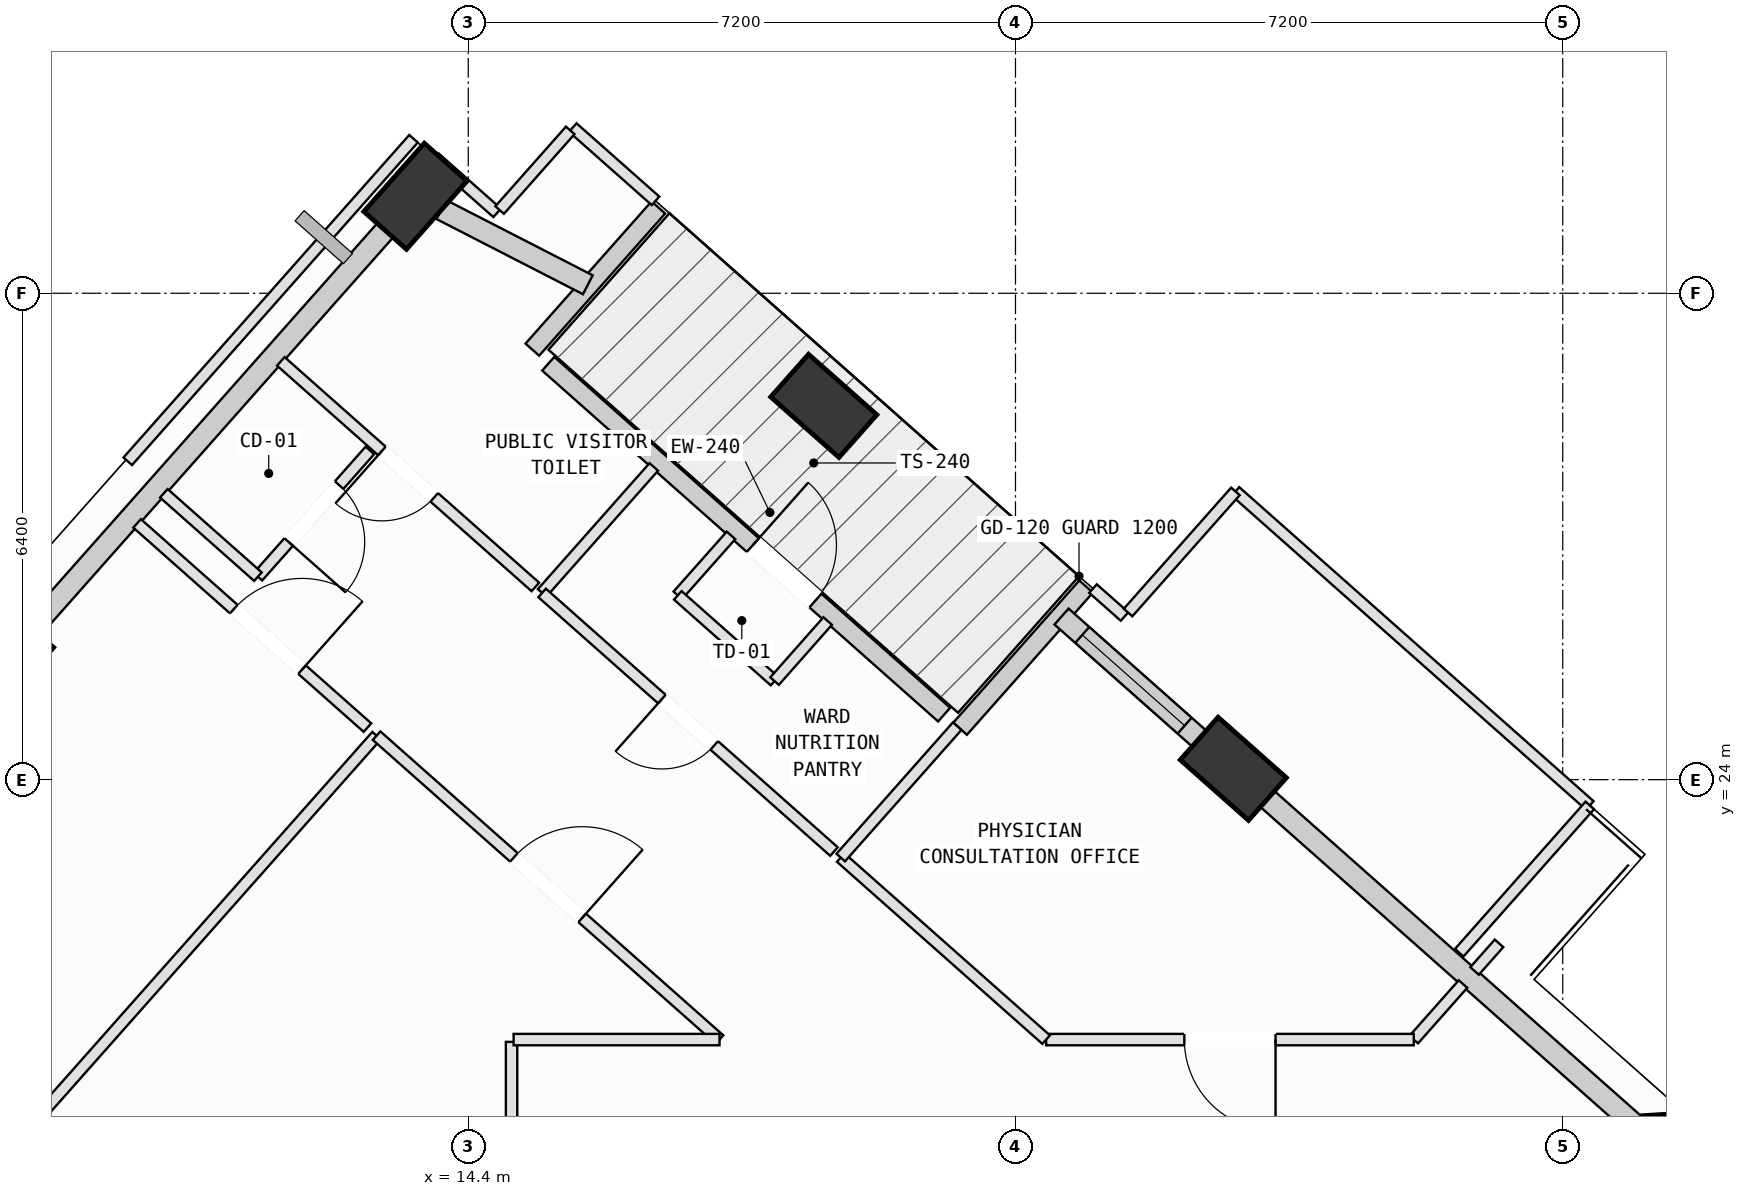
"""IFC4 building model, lengths in metres.
Left out: names, types, materials, properties, quantities, classifications, styles, units other than length and angle.
Written with IfcOpenShell. Run it as: python <this file> out.ifc"""

import sys

from ifc_helpers import new_model, si_unit, direction, frame, frame_2d, origin, origin_2d, place, context, subcontext, project, spatial, rectangle, extrude, element, fill, save


model = new_model("IFC4")
c1 = context("Model", 3, precision=1e-05, world=origin(), true_north=direction((0.0, 1.0)))
c2 = subcontext(c1, "Body", "Model", "MODEL_VIEW")
j1 = project(units=[si_unit("LENGTHUNIT", "METRE"), si_unit("PLANEANGLEUNIT", "RADIAN")], contexts=[c1])
p1 = place(None, origin())
s1 = spatial("IfcSite", under=j1, at=p1, CompositionType="ELEMENT")
p2 = place(p1, origin())
s2 = spatial("IfcBuilding", under=s1, at=p2, CompositionType="ELEMENT")
p3 = place(p2, frame((0.0, 0.0, 231.2)))
s3 = spatial("IfcBuildingStorey", under=s2, at=p3, CompositionType="ELEMENT", Elevation=231.2)
p4 = place(p3, frame((30.266, 19.003, 0.002), z_axis=(0.024121719548, -0.013618084707, 0.999616271584), x_axis=(-0.898481897541, 0.438138960704, 0.02765015198)))
e1 = element("IfcColumn", 1, at=p4, inside=s3, PredefinedType="COLUMN", context=c2, shape_type="SweptSolid", body=[
    extrude(rectangle(XDim=1.2, YDim=0.75, at=origin_2d()), origin(), (0.0, 0.0, 1.0), 3.998),
])
p5 = place(p3, frame((24.466, 24.143, 0.002), z_axis=(0.002991304926, -0.037849164373, 0.999278986495), x_axis=(-0.798270232105, 0.601772774406, 0.025182623343)))
e2 = element("IfcColumn", 2, at=p5, inside=s3, PredefinedType="COLUMN", context=c2, shape_type="SweptSolid", body=[
    extrude(rectangle(XDim=1.2, YDim=0.75, at=origin_2d()), origin(), (0.0, 0.0, 1.0), 3.999),
])
p6 = place(p3, frame((19.078, 28.918, 0.002), z_axis=(-0.016523414355, -0.060179372579, 0.998050810277), x_axis=(-0.54639584445, 0.836503575836, 0.041392617478)))
e3 = element("IfcColumn", 3, at=p6, inside=s3, PredefinedType="COLUMN", context=c2, shape_type="SweptSolid", body=[
    extrude(rectangle(XDim=1.2, YDim=0.75, at=origin_2d()), origin(), (0.0, 0.0, 1.0), 4.004),
])
p7 = place(p3, frame((13.705, 31.676, 0.002), z_axis=(-0.027691212934, -0.082404180907, 0.996214207736), x_axis=(0.866207153249, 0.495431720125, 0.065058268909)))
e4 = element("IfcColumn", 4, at=p7, inside=s3, PredefinedType="COLUMN", context=c2, shape_type="SweptSolid", body=[
    extrude(rectangle(XDim=1.2, YDim=0.75, at=origin_2d()), origin(), (0.0, 0.0, 1.0), 4.011),
])
p8 = place(p3, frame((8.266, 25.539, 0.002), z_axis=(-0.002187246162, -0.104441004248, 0.994528678614), x_axis=(0.678711632821, 0.73023191979, 0.078178403623)))
e5 = element("IfcColumn", 5, at=p8, inside=s3, PredefinedType="COLUMN", context=c2, shape_type="SweptSolid", body=[
    extrude(rectangle(XDim=1.2, YDim=0.75, at=origin_2d()), origin(), (0.0, 0.0, 1.0), 4.018),
])
p9 = place(p3, frame((15.453, 29.472, 0.0), z_axis=(0.0, 0.0, 1.0), x_axis=(0.748374243489, -0.663276708232, 0.0)))
e6 = element("IfcWall", 6, at=p9, inside=s3, PredefinedType="SOLIDWALL", context=c2, shape_type="SweptSolid", body=[
    extrude(rectangle(XDim=6.96, YDim=0.24, at=frame_2d((3.48, 0.0))), origin(), (0.0, 0.0, 1.0), 3.265),
])
p10 = place(p9, frame((3.597, 0.0, 0.0)))
e7 = element("IfcOpeningElement", 7, at=p10, cuts=e6, PredefinedType="OPENING", context=c2, shape_type="SweptSolid", body=[
    extrude(rectangle(XDim=1.1, YDim=2.15, at=frame_2d((0.55, 1.075))), frame((0.0, 0.13, 0.0), z_axis=(0.0, -1.0, 0.0), x_axis=(1.0, 0.0, 0.0)), (0.0, 0.0, 1.0), 0.26),
])
p11 = place(p3, frame((20.871, 24.67, 0.0), z_axis=(0.0, 0.0, 1.0), x_axis=(0.663241629679, 0.748405331796, 0.0)))
e8 = element("IfcWall", 8, at=p11, inside=s3, PredefinedType="SOLIDWALL", context=c2, shape_type="SweptSolid", body=[
    extrude(rectangle(XDim=2.5, YDim=0.24, at=frame_2d((1.25, 0.0))), origin(), (0.0, 0.0, 1.0), 3.265),
])
p12 = place(p3, frame((16.901, 31.529, 0.0), z_axis=(0.0, 0.0, 1.0), x_axis=(-0.663296327446, -0.748356854714, 0.0)))
e9 = element("IfcWall", 9, at=p12, inside=s3, PredefinedType="SOLIDWALL", context=c2, shape_type="SweptSolid", body=[
    extrude(rectangle(XDim=2.5, YDim=0.24, at=frame_2d((1.25, 0.0))), origin(), (0.0, 0.0, 1.0), 3.265),
])
p13 = place(p3, frame((24.802, 23.845, 0.0), z_axis=(0.0, 0.0, 1.0), x_axis=(0.748368709558, -0.663282952106, 0.0)))
e10 = element("IfcWall", 10, at=p13, inside=s3, PredefinedType="SOLIDWALL", context=c2, shape_type="SweptSolid", body=[
    extrude(rectangle(XDim=6.958, YDim=0.28, at=frame_2d((3.479, 0.0))), origin(), (0.0, 0.0, 1.0), 3.165),
])
p14 = place(p3, frame((22.206, 26.146, 0.0), z_axis=(0.0, 0.0, 1.0), x_axis=(0.74835824109, -0.663294763278, 0.0)))
e11 = element("IfcWall", 11, at=p14, inside=s3, PredefinedType="SOLIDWALL", context=c2, shape_type="SweptSolid", body=[
    extrude(rectangle(XDim=2.681, YDim=0.28, at=frame_2d((1.34, 0.0))), origin(), (0.0, 0.0, 1.0), 3.245),
])
p15 = place(p14, frame((0.365, 0.0, 0.75)))
e12 = element("IfcOpeningElement", 12, at=p15, cuts=e11, PredefinedType="OPENING", context=c2, shape_type="SweptSolid", body=[
    extrude(rectangle(XDim=1.8, YDim=2.05, at=frame_2d((0.9, 1.025))), frame((0.0, 0.15, 0.0), z_axis=(0.0, -1.0, 0.0), x_axis=(1.0, 0.0, 0.0)), (0.0, 0.0, 1.0), 0.3),
])
p16 = place(p3, frame((14.046, 31.501, 0.0), z_axis=(0.0, 0.0, 1.0), x_axis=(0.88971181746, -0.456522597329, 0.0)))
e13 = element("IfcWall", 13, at=p16, inside=s3, PredefinedType="SOLIDWALL", context=c2, shape_type="SweptSolid", body=[
    extrude(rectangle(XDim=2.166, YDim=0.28, at=frame_2d((1.083, 0.0))), origin(), (0.0, 0.0, 1.0), 3.265),
])
p17 = place(p3, frame((8.407, 25.699, 0.0), z_axis=(0.0, 0.0, 1.0), x_axis=(0.66326446151, 0.748385097458, 0.0)))
e14 = element("IfcWall", 14, at=p17, inside=s3, PredefinedType="SOLIDWALL", context=c2, shape_type="SweptSolid", body=[
    extrude(rectangle(XDim=7.434, YDim=0.28, at=frame_2d((3.717, 0.0))), origin(), (0.0, 0.0, 1.0), 3.265),
])
p18 = place(p3, frame((14.97, 20.55, 0.0), z_axis=(0.0, 0.0, 1.0), x_axis=(0.0, -1.0, 0.0)))
e15 = element("IfcWall", 15, at=p18, inside=s3, PredefinedType="PARTITIONING", context=c2, shape_type="SweptSolid", body=[
    extrude(rectangle(XDim=2.32, YDim=0.15, at=frame_2d((1.16, 0.0))), origin(), (0.0, 0.0, 1.0), 3.78),
])
p19 = place(p3, frame((3.921, 14.117, 0.0), z_axis=(0.0, 0.0, 1.0), x_axis=(0.663304180291, 0.748349894374, 0.0)))
e16 = element("IfcWall", 16, at=p19, inside=s3, PredefinedType="PARTITIONING", context=c2, shape_type="SweptSolid", body=[
    extrude(rectangle(XDim=13.98, YDim=0.15, at=frame_2d((6.99, 0.0))), origin(), (0.0, 0.0, 1.0), 3.78),
])
p20 = place(p3, frame((13.194, 24.579, 0.0), z_axis=(0.0, 0.0, 1.0), x_axis=(0.748364755265, -0.663287413627, 0.0)))
e17 = element("IfcWall", 17, at=p20, inside=s3, PredefinedType="PARTITIONING", context=c2, shape_type="SweptSolid", body=[
    extrude(rectangle(XDim=6.029, YDim=0.15, at=frame_2d((3.015, 0.0))), origin(), (0.0, 0.0, 1.0), 3.78),
])
p21 = place(p20, frame((2.415, 0.0, 0.0)))
e18 = element("IfcOpeningElement", 18, at=p21, cuts=e17, PredefinedType="OPENING", context=c2, shape_type="SweptSolid", body=[
    extrude(rectangle(XDim=1.2, YDim=2.15, at=frame_2d((0.6, 1.075))), frame((0.0, 0.085, 0.0), z_axis=(0.0, -1.0, 0.0), x_axis=(1.0, 0.0, 0.0)), (0.0, 0.0, 1.0), 0.17),
])
p22 = place(p3, frame((17.706, 20.58, 0.0), z_axis=(0.0, 0.0, 1.0), x_axis=(-1.0, 0.0, 0.0)))
e19 = element("IfcWall", 19, at=p22, inside=s3, PredefinedType="PARTITIONING", context=c2, shape_type="SweptSolid", body=[
    extrude(rectangle(XDim=2.709, YDim=0.15, at=frame_2d((1.354, 0.0))), origin(), (0.0, 0.0, 1.0), 3.78),
])
p23 = place(p3, frame((10.043, 27.372, 0.0), z_axis=(0.0, 0.0, 1.0), x_axis=(0.748293219075, -0.663368116725, 0.0)))
e20 = element("IfcWall", 20, at=p23, inside=s3, PredefinedType="PARTITIONING", context=c2, shape_type="SweptSolid", body=[
    extrude(rectangle(XDim=4.051, YDim=0.15, at=frame_2d((2.025, 0.0))), origin(), (0.0, 0.0, 1.0), 3.78),
])
p24 = place(p23, frame((1.7, 0.0, 0.0)))
e21 = element("IfcOpeningElement", 21, at=p24, cuts=e20, PredefinedType="OPENING", context=c2, shape_type="SweptSolid", body=[
    extrude(rectangle(XDim=1.2, YDim=2.15, at=frame_2d((0.6, 1.075))), frame((0.0, 0.085, 0.0), z_axis=(0.0, -1.0, 0.0), x_axis=(1.0, 0.0, 0.0)), (0.0, 0.0, 1.0), 0.17),
])
p25 = place(p3, frame((27.962, 21.846, 0.0), z_axis=(0.0, 0.0, 1.0), x_axis=(-0.663582811179, -0.74810283565, 0.0)))
e22 = element("IfcWall", 22, at=p25, inside=s3, PredefinedType="PARTITIONING", context=c2, shape_type="SweptSolid", body=[
    extrude(rectangle(XDim=0.485, YDim=0.15, at=frame_2d((0.243, 0.0))), origin(), (0.0, 0.0, 1.0), 3.78),
])
p26 = place(p3, frame((27.488, 21.311, 0.0), z_axis=(0.0, 0.0, 1.0), x_axis=(-0.663339325508, -0.748318741737, 0.0)))
e23 = element("IfcWall", 23, at=p26, inside=s3, PredefinedType="PARTITIONING", context=c2, shape_type="SweptSolid", body=[
    extrude(rectangle(XDim=0.977, YDim=0.15, at=frame_2d((0.488, 0.0))), origin(), (0.0, 0.0, 1.0), 3.78),
])
p27 = place(p3, frame((26.84, 20.58, 0.0), z_axis=(0.0, 0.0, 1.0), x_axis=(-1.0, 0.0, 0.0)))
e24 = element("IfcWall", 24, at=p27, inside=s3, PredefinedType="PARTITIONING", context=c2, shape_type="SweptSolid", body=[
    extrude(rectangle(XDim=4.837, YDim=0.15, at=frame_2d((2.418, 0.0))), origin(), (0.0, 0.0, 1.0), 3.415),
])
p28 = place(p27, frame((1.819, 0.0, 0.0)))
e25 = element("IfcOpeningElement", 25, at=p28, cuts=e24, PredefinedType="OPENING", context=c2, shape_type="SweptSolid", body=[
    extrude(rectangle(XDim=1.2, YDim=2.15, at=frame_2d((0.6, 1.075))), frame((0.0, 0.085, 0.0), z_axis=(0.0, -1.0, 0.0), x_axis=(1.0, 0.0, 0.0)), (0.0, 0.0, 1.0), 0.17),
])
p29 = place(p3, frame((22.003, 20.58, 0.0), z_axis=(0.0, 0.0, 1.0), x_axis=(-0.748326342524, 0.663330750896, 0.0)))
e26 = element("IfcWall", 26, at=p29, inside=s3, PredefinedType="PARTITIONING", context=c2, shape_type="SweptSolid", body=[
    extrude(rectangle(XDim=3.611, YDim=0.15, at=frame_2d((1.805, 0.0))), origin(), (0.0, 0.0, 1.0), 3.78),
])
p30 = place(p3, frame((19.301, 22.975, 0.0), z_axis=(0.0, 0.0, 1.0), x_axis=(0.663175680101, 0.74846377155, 0.0)))
e27 = element("IfcWall", 27, at=p30, inside=s3, PredefinedType="PARTITIONING", context=c2, shape_type="SweptSolid", body=[
    extrude(rectangle(XDim=2.31, YDim=0.15, at=frame_2d((1.155, 0.0))), origin(), (0.0, 0.0, 1.0), 3.78),
])
p31 = place(p3, frame((22.62, 26.514, 0.0), z_axis=(0.0, 0.0, 1.0), x_axis=(0.748988148045, -0.662583394063, 0.0)))
e28 = element("IfcWall", 28, at=p31, inside=s3, PredefinedType="PARTITIONING", context=c2, shape_type="SweptSolid", body=[
    extrude(rectangle(XDim=0.554, YDim=0.15, at=frame_2d((0.277, 0.0))), origin(), (0.0, 0.0, 1.0), 3.78),
])
p32 = place(p3, frame((15.372, 26.457, 0.0), z_axis=(0.0, 0.0, 1.0), x_axis=(0.663165819738, 0.7484725082, 0.0)))
e29 = element("IfcWall", 29, at=p32, inside=s3, PredefinedType="PARTITIONING", context=c2, shape_type="SweptSolid", body=[
    extrude(rectangle(XDim=2.215, YDim=0.15, at=frame_2d((1.107, 0.0))), origin(), (0.0, 0.0, 1.0), 3.78),
])
p33 = place(p3, frame((17.857, 27.214, 0.0), z_axis=(0.0, 0.0, 1.0), x_axis=(-0.663602063318, -0.748085758159, 0.0)))
e30 = element("IfcWall", 30, at=p33, inside=s3, PredefinedType="PARTITIONING", context=c2, shape_type="SweptSolid", body=[
    extrude(rectangle(XDim=1.055, YDim=0.15, at=frame_2d((0.527, 0.0))), origin(), (0.0, 0.0, 1.0), 3.78),
])
p34 = place(p3, frame((17.157, 26.425, 0.0), z_axis=(0.0, 0.0, 1.0), x_axis=(0.748453811161, -0.663186921282, 0.0)))
e31 = element("IfcWall", 31, at=p34, inside=s3, PredefinedType="PARTITIONING", context=c2, shape_type="SweptSolid", body=[
    extrude(rectangle(XDim=1.701, YDim=0.15, at=frame_2d((0.85, 0.0))), origin(), (0.0, 0.0, 1.0), 3.78),
])
p35 = place(p3, frame((18.43, 25.297, 0.0), z_axis=(0.0, 0.0, 1.0), x_axis=(0.662738690452, 0.748850738251, 0.0)))
e32 = element("IfcWall", 32, at=p35, inside=s3, PredefinedType="PARTITIONING", context=c2, shape_type="SweptSolid", body=[
    extrude(rectangle(XDim=1.055, YDim=0.15, at=frame_2d((0.527, 0.0))), origin(), (0.0, 0.0, 1.0), 3.78),
])
p36 = place(p3, frame((19.212, 23.054, 0.0), z_axis=(0.0, 0.0, 1.0), x_axis=(-0.748387735165, 0.663261485279, 0.0)))
e33 = element("IfcWall", 33, at=p36, inside=s3, PredefinedType="PARTITIONING", context=c2, shape_type="SweptSolid", body=[
    extrude(rectangle(XDim=5.131, YDim=0.15, at=frame_2d((2.565, 0.0))), origin(), (0.0, 0.0, 1.0), 3.78),
])
p37 = place(p36, frame((2.105, 0.0, 0.0)))
e34 = element("IfcOpeningElement", 34, at=p37, cuts=e33, PredefinedType="OPENING", context=c2, shape_type="SweptSolid", body=[
    extrude(rectangle(XDim=0.92, YDim=2.1, at=frame_2d((0.46, 1.05))), frame((0.0, 0.085, 0.0), z_axis=(0.0, -1.0, 0.0), x_axis=(1.0, 0.0, 0.0)), (0.0, 0.0, 1.0), 0.17),
])
p38 = place(p3, frame((15.775, 32.58, 0.0), z_axis=(0.0, 0.0, 1.0), x_axis=(0.748769053237, -0.662830977636, 0.0)))
e35 = element("IfcWall", 35, at=p38, inside=s3, PredefinedType="PARTITIONING", context=c2, shape_type="SweptSolid", body=[
    extrude(rectangle(XDim=1.455, YDim=0.15, at=frame_2d((0.727, 0.0))), origin(), (0.0, 0.0, 1.0), 3.78),
])
p39 = place(p3, frame((15.283, 26.536, 0.0), z_axis=(0.0, 0.0, 1.0), x_axis=(-0.748380790805, 0.66326932083, 0.0)))
e36 = element("IfcWall", 36, at=p39, inside=s3, PredefinedType="PARTITIONING", context=c2, shape_type="SweptSolid", body=[
    extrude(rectangle(XDim=4.475, YDim=0.15, at=frame_2d((2.237, 0.0))), origin(), (0.0, 0.0, 1.0), 3.78),
])
p40 = place(p39, frame((1.778, 0.0, 0.0)))
e37 = element("IfcOpeningElement", 37, at=p40, cuts=e36, PredefinedType="OPENING", context=c2, shape_type="SweptSolid", body=[
    extrude(rectangle(XDim=0.92, YDim=2.1, at=frame_2d((0.46, 1.05))), frame((0.0, 0.085, 0.0), z_axis=(0.0, -1.0, 0.0), x_axis=(1.0, 0.0, 0.0)), (0.0, 0.0, 1.0), 0.17),
])
p41 = place(p3, frame((13.196, 31.389, 0.0), z_axis=(0.0, 0.0, 1.0), x_axis=(0.663070703507, 0.74855677283, 0.0)))
e38 = element("IfcWall", 38, at=p41, inside=s3, PredefinedType="PARTITIONING", context=c2, shape_type="SweptSolid", body=[
    extrude(rectangle(XDim=1.102, YDim=0.15, at=frame_2d((0.551, 0.0))), origin(), (0.0, 0.0, 1.0), 3.265),
])
p42 = place(p3, frame((13.964, 32.181, 0.0), z_axis=(0.0, 0.0, 1.0), x_axis=(0.748483361192, -0.663153570464, 0.0)))
e39 = element("IfcWall", 39, at=p42, inside=s3, PredefinedType="PARTITIONING", context=c2, shape_type="SweptSolid", body=[
    extrude(rectangle(XDim=1.09, YDim=0.15, at=frame_2d((0.545, 0.0))), origin(), (0.0, 0.0, 1.0), 3.78),
])
p43 = place(p3, frame((14.813, 31.495, 0.0), z_axis=(0.0, 0.0, 1.0), x_axis=(0.663378519778, 0.748283996553, 0.0)))
e40 = element("IfcWall", 40, at=p43, inside=s3, PredefinedType="PARTITIONING", context=c2, shape_type="SweptSolid", body=[
    extrude(rectangle(XDim=1.4, YDim=0.15, at=frame_2d((0.7, 0.0))), origin(), (0.0, 0.0, 1.0), 3.78),
])
p44 = place(p3, frame((13.106, 28.332, 0.0), z_axis=(0.0, 0.0, 1.0), x_axis=(-0.663441871076, -0.748227828742, 0.0)))
e41 = element("IfcWall", 41, at=p44, inside=s3, PredefinedType="PARTITIONING", context=c2, shape_type="SweptSolid", body=[
    extrude(rectangle(XDim=2.22, YDim=0.15, at=frame_2d((1.11, 0.0))), origin(), (0.0, 0.0, 1.0), 3.78),
])
p45 = place(p44, frame((0.61, 0.0, 0.0)))
e42 = element("IfcOpeningElement", 42, at=p45, cuts=e41, PredefinedType="OPENING", context=c2, shape_type="SweptSolid", body=[
    extrude(rectangle(XDim=1.0, YDim=2.12, at=frame_2d((0.5, 1.06))), frame((0.0, 0.085, 0.0), z_axis=(0.0, -1.0, 0.0), x_axis=(1.0, 0.0, 0.0)), (0.0, 0.0, 1.0), 0.17),
])
p46 = place(p3, frame((11.633, 26.671, 0.0), z_axis=(0.0, 0.0, 1.0), x_axis=(-0.74840188068, 0.663245523916, 0.0)))
e43 = element("IfcWall", 43, at=p46, inside=s3, PredefinedType="PARTITIONING", context=c2, shape_type="SweptSolid", body=[
    extrude(rectangle(XDim=1.654, YDim=0.15, at=frame_2d((0.827, 0.0))), origin(), (0.0, 0.0, 1.0), 3.78),
])
p47 = place(p3, frame((9.92, 28.189, 0.0), z_axis=(0.0, 0.0, 1.0), x_axis=(0.663125550509, 0.748508185835, 0.0)))
e44 = element("IfcWall", 44, at=p47, inside=s3, PredefinedType="PARTITIONING", context=c2, shape_type="SweptSolid", body=[
    extrude(rectangle(XDim=5.67, YDim=0.15, at=frame_2d((2.835, 0.0))), origin(), (0.0, 0.0, 1.0), 3.78),
])
p48 = place(p3, frame((24.494, 27.793, 0.0), z_axis=(0.0, 0.0, 1.0), x_axis=(0.748366392049, -0.663285566895, 0.0)))
e45 = element("IfcWall", 45, at=p48, inside=s3, PredefinedType="PARTITIONING", context=c2, shape_type="SweptSolid", body=[
    extrude(rectangle(XDim=6.23, YDim=0.15, at=frame_2d((3.115, 0.0))), origin(), (0.0, 0.0, 1.0), 3.78),
])
p49 = place(p3, frame((29.156, 23.661, 0.0), z_axis=(0.0, 0.0, 1.0), x_axis=(-0.663362704321, -0.74829801718, 0.0)))
e46 = element("IfcWall", 46, at=p49, inside=s3, PredefinedType="PARTITIONING", context=c2, shape_type="SweptSolid", body=[
    extrude(rectangle(XDim=2.59, YDim=0.15, at=frame_2d((1.295, 0.0))), origin(), (0.0, 0.0, 1.0), 3.78),
])
p50 = place(p3, frame((23.081, 26.199, 0.0), z_axis=(0.0, 0.0, 1.0), x_axis=(0.663303137742, 0.748350818441, 0.0)))
e47 = element("IfcWall", 47, at=p50, inside=s3, PredefinedType="PARTITIONING", context=c2, shape_type="SweptSolid", body=[
    extrude(rectangle(XDim=2.13, YDim=0.15, at=frame_2d((1.065, 0.0))), origin(), (0.0, 0.0, 1.0), 3.78),
])
p51 = place(p10, origin())
e48 = element("IfcDoor", 48, at=p51, inside=s3, OperationType="SINGLE_SWING_LEFT", PredefinedType="DOOR", context=c2, shape_type="SweptSolid", body=[
    extrude(rectangle(XDim=1.1, YDim=2.15, at=frame_2d((0.55, 1.075))), frame((0.0, 0.025, 0.0), z_axis=(0.0, -1.0, 0.0), x_axis=(1.0, 0.0, 0.0)), (0.0, 0.0, 1.0), 0.05),
])
fill(e7, e48)
p52 = place(p15, origin())
e49 = element("IfcWindow", 49, at=p52, inside=s3, PartitioningType="SINGLE_PANEL", PredefinedType="WINDOW", context=c2, shape_type="SweptSolid", body=[
    extrude(rectangle(XDim=1.8, YDim=2.05, at=frame_2d((0.9, 1.025))), frame((0.0, 0.03, 0.0), z_axis=(0.0, -1.0, 0.0), x_axis=(1.0, 0.0, 0.0)), (0.0, 0.0, 1.0), 0.06),
])
fill(e12, e49)
p53 = place(p21, origin())
e50 = element("IfcDoor", 50, at=p53, inside=s3, OperationType="SINGLE_SWING_RIGHT", PredefinedType="DOOR", context=c2, shape_type="SweptSolid", body=[
    extrude(rectangle(XDim=1.2, YDim=2.15, at=frame_2d((0.6, 1.075))), frame((0.0, 0.025, 0.0), z_axis=(0.0, -1.0, 0.0), x_axis=(1.0, 0.0, 0.0)), (0.0, 0.0, 1.0), 0.05),
])
fill(e18, e50)
p54 = place(p24, origin())
e51 = element("IfcDoor", 51, at=p54, inside=s3, OperationType="SINGLE_SWING_RIGHT", PredefinedType="DOOR", context=c2, shape_type="SweptSolid", body=[
    extrude(rectangle(XDim=1.2, YDim=2.15, at=frame_2d((0.6, 1.075))), frame((0.0, 0.025, 0.0), z_axis=(0.0, -1.0, 0.0), x_axis=(1.0, 0.0, 0.0)), (0.0, 0.0, 1.0), 0.05),
])
fill(e21, e51)
p55 = place(p28, origin())
e52 = element("IfcDoor", 52, at=p55, inside=s3, OperationType="SINGLE_SWING_LEFT", PredefinedType="DOOR", context=c2, shape_type="SweptSolid", body=[
    extrude(rectangle(XDim=1.2, YDim=2.15, at=frame_2d((0.6, 1.075))), frame((0.0, 0.025, 0.0), z_axis=(0.0, -1.0, 0.0), x_axis=(1.0, 0.0, 0.0)), (0.0, 0.0, 1.0), 0.05),
])
fill(e25, e52)
p56 = place(p37, origin())
e53 = element("IfcDoor", 53, at=p56, inside=s3, OperationType="SINGLE_SWING_RIGHT", PredefinedType="DOOR", context=c2, shape_type="SweptSolid", body=[
    extrude(rectangle(XDim=0.92, YDim=2.1, at=frame_2d((0.46, 1.05))), frame((0.0, 0.025, 0.0), z_axis=(0.0, -1.0, 0.0), x_axis=(1.0, 0.0, 0.0)), (0.0, 0.0, 1.0), 0.05),
])
fill(e34, e53)
p57 = place(p40, origin())
e54 = element("IfcDoor", 54, at=p57, inside=s3, OperationType="SINGLE_SWING_RIGHT", PredefinedType="DOOR", context=c2, shape_type="SweptSolid", body=[
    extrude(rectangle(XDim=0.92, YDim=2.1, at=frame_2d((0.46, 1.05))), frame((0.0, 0.025, 0.0), z_axis=(0.0, -1.0, 0.0), x_axis=(1.0, 0.0, 0.0)), (0.0, 0.0, 1.0), 0.05),
])
fill(e37, e54)
p58 = place(p45, origin())
e55 = element("IfcDoor", 55, at=p58, inside=s3, OperationType="SINGLE_SWING_RIGHT", PredefinedType="DOOR", context=c2, shape_type="SweptSolid", body=[
    extrude(rectangle(XDim=1.0, YDim=2.12, at=frame_2d((0.5, 1.06))), frame((0.0, 0.025, 0.0), z_axis=(0.0, -1.0, 0.0), x_axis=(1.0, 0.0, 0.0)), (0.0, 0.0, 1.0), 0.05),
])
fill(e42, e55)
save(model, sys.argv[1])
